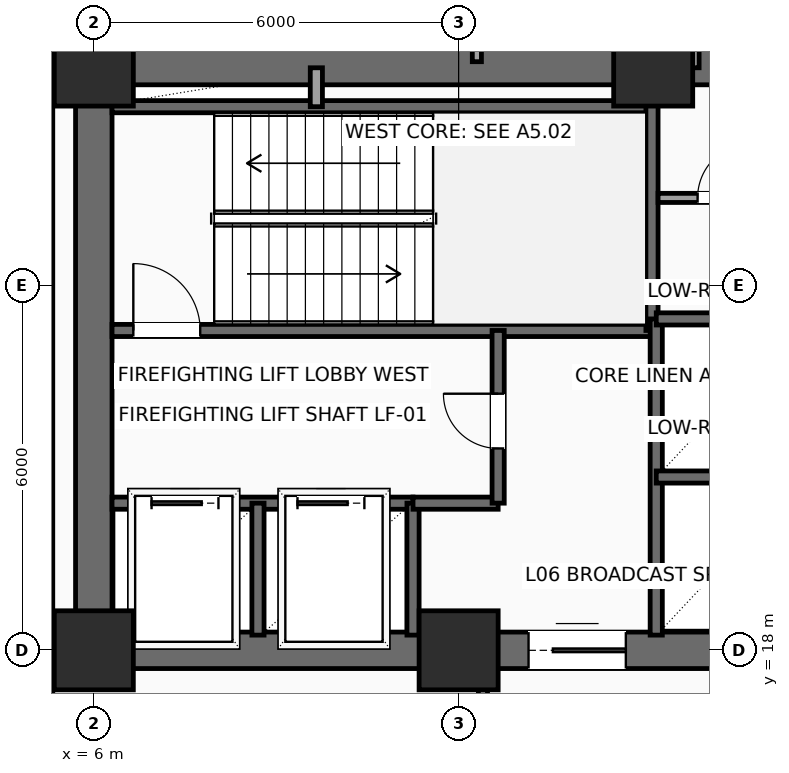
"""IFC4 building model, lengths in metres.
Left out: names, types, materials, properties, quantities, classifications, styles, units other than length and angle.
Written with IfcOpenShell. Run it as: python <this file> out.ifc"""

import sys

from ifc_helpers import new_model, si_unit, direction, frame, frame_2d, origin, origin_2d, place, context, subcontext, project, spatial, rectangle, extrude, element, fill, save


model = new_model("IFC4")
c1 = context("Model", 3, precision=1e-05, world=origin(), true_north=direction((0.0, 1.0)))
c2 = subcontext(c1, "Body", "Model", "MODEL_VIEW")
j1 = project(units=[si_unit("LENGTHUNIT", "METRE"), si_unit("PLANEANGLEUNIT", "RADIAN")], contexts=[c1])
p1 = place(None, origin())
s1 = spatial("IfcSite", under=j1, at=p1, CompositionType="ELEMENT")
p2 = place(p1, origin())
s2 = spatial("IfcBuilding", under=s1, at=p2, CompositionType="ELEMENT")
p3 = place(p2, frame((0.0, 0.0, 32.4)))
s3 = spatial("IfcBuildingStorey", under=s2, at=p3, CompositionType="ELEMENT", Elevation=32.4)
for number, where, z_axis, x_axis in (
    (1, (6.0, 18.0, 0.0), (0.0, 0.0, 1.0), (1.0, 0.0, 0.0)),
    (2, (12.0, 18.0, 0.0), (0.0, 0.0, 1.0), (1.0, 0.0, 0.0)),
    (3, (6.0, 27.6, 0.0), (0.0, 0.0, 1.0), (1.0, 0.0, 0.0)),
    (4, (15.2, 27.6, 0.0), (0.0, 0.0, 1.0), (1.0, 0.0, 0.0)),
):
    element("IfcColumn", number, at=place(p3, frame(where, z_axis=z_axis, x_axis=x_axis)), inside=s3, PredefinedType="COLUMN", context=c2, shape_type="SweptSolid", body=[
        extrude(rectangle(XDim=1.3, YDim=1.3, at=origin_2d()), origin(), (0.0, 0.0, 1.0), 3.9),
    ])
p4 = place(p3, frame((6.0, 18.0, 0.0), z_axis=(0.0, 0.0, 1.0), x_axis=(1.0, 0.0, 0.0)))
e5 = element("IfcWall", 5, at=p4, inside=s3, PredefinedType="SHEAR", context=c2, shape_type="SweptSolid", body=[
    extrude(rectangle(XDim=12.0, YDim=0.6, at=frame_2d((6.0, 0.0))), origin(), (0.0, 0.0, 1.0), 3.65),
])
p5 = place(p4, frame((7.15, 0.0, 0.0)))
e6 = element("IfcOpeningElement", 6, at=p5, cuts=e5, PredefinedType="OPENING", context=c2, shape_type="SweptSolid", body=[
    extrude(rectangle(XDim=1.6, YDim=2.3, at=frame_2d((0.8, 1.15))), frame((0.0, 0.31, 0.0), z_axis=(0.0, -1.0, 0.0), x_axis=(1.0, 0.0, 0.0)), (0.0, 0.0, 1.0), 0.62),
])
p6 = place(p3, frame((6.0, 27.6, 0.0), z_axis=(0.0, 0.0, 1.0), x_axis=(1.0, 0.0, 0.0)))
e7 = element("IfcWall", 7, at=p6, inside=s3, PredefinedType="SHEAR", context=c2, shape_type="SweptSolid", body=[
    extrude(rectangle(XDim=12.0, YDim=0.6, at=frame_2d((6.0, 0.0))), origin(), (0.0, 0.0, 1.0), 3.65),
])
p7 = place(p6, frame((10.2, 0.0, 0.0)))
e8 = element("IfcOpeningElement", 8, at=p7, cuts=e7, PredefinedType="OPENING", context=c2, shape_type="SweptSolid", body=[
    extrude(rectangle(XDim=0.9, YDim=2.15, at=frame_2d((0.45, 1.075))), frame((0.0, 0.31, 0.0), z_axis=(0.0, -1.0, 0.0), x_axis=(1.0, 0.0, 0.0)), (0.0, 0.0, 1.0), 0.62),
])
p8 = place(p3, frame((6.0, 18.0, 0.0), z_axis=(0.0, 0.0, 1.0), x_axis=(0.0, 1.0, 0.0)))
e9 = element("IfcWall", 9, at=p8, inside=s3, PredefinedType="SHEAR", context=c2, shape_type="SweptSolid", body=[
    extrude(rectangle(XDim=9.6, YDim=0.6, at=frame_2d((4.8, 0.0))), origin(), (0.0, 0.0, 1.0), 3.65),
])
p9 = place(p3, frame((6.3, 23.26, 0.0), z_axis=(0.0, 0.0, 1.0), x_axis=(1.0, 0.0, 0.0)))
e10 = element("IfcWall", 10, at=p9, inside=s3, PredefinedType="SHEAR", context=c2, shape_type="SweptSolid", body=[
    extrude(rectangle(XDim=8.88, YDim=0.2, at=frame_2d((4.44, 0.0))), origin(), (0.0, 0.0, 1.0), 3.65),
])
p10 = place(p9, frame((0.35, 0.0, 0.0)))
e11 = element("IfcOpeningElement", 11, at=p10, cuts=e10, PredefinedType="OPENING", context=c2, shape_type="SweptSolid", body=[
    extrude(rectangle(XDim=1.1, YDim=2.2, at=frame_2d((0.55, 1.1))), frame((0.0, 0.11, 0.0), z_axis=(0.0, -1.0, 0.0), x_axis=(1.0, 0.0, 0.0)), (0.0, 0.0, 1.0), 0.22),
])
p11 = place(p3, frame((6.3, 26.94, 0.0), z_axis=(0.0, 0.0, 1.0), x_axis=(1.0, 0.0, 0.0)))
e12 = element("IfcWall", 12, at=p11, inside=s3, PredefinedType="SHEAR", context=c2, shape_type="SweptSolid", body=[
    extrude(rectangle(XDim=8.88, YDim=0.2, at=frame_2d((4.44, 0.0))), origin(), (0.0, 0.0, 1.0), 3.65),
])
p12 = place(p3, frame((15.18, 23.26, 0.0), z_axis=(0.0, 0.0, 1.0), x_axis=(0.0, 1.0, 0.0)))
e13 = element("IfcWall", 13, at=p12, inside=s3, PredefinedType="SHEAR", context=c2, shape_type="SweptSolid", body=[
    extrude(rectangle(XDim=4.04, YDim=0.2, at=frame_2d((2.02, 0.0))), origin(), (0.0, 0.0, 1.0), 3.65),
])
p13 = place(p3, frame((6.3, 20.42, 0.0), z_axis=(0.0, 0.0, 1.0), x_axis=(1.0, 0.0, 0.0)))
e14 = element("IfcWall", 14, at=p13, inside=s3, PredefinedType="SHEAR", context=c2, shape_type="SweptSolid", body=[
    extrude(rectangle(XDim=4.95, YDim=0.2, at=frame_2d((2.475, 0.0))), origin(), (0.0, 0.0, 1.0), 3.65),
])
p14 = place(p13, frame((0.65, 0.0, 0.0)))
e15 = element("IfcOpeningElement", 15, at=p14, cuts=e14, PredefinedType="OPENING", context=c2, shape_type="SweptSolid", body=[
    extrude(rectangle(XDim=1.1, YDim=2.2, at=frame_2d((0.55, 1.1))), frame((0.0, 0.11, 0.0), z_axis=(0.0, -1.0, 0.0), x_axis=(1.0, 0.0, 0.0)), (0.0, 0.0, 1.0), 0.22),
])
p15 = place(p13, frame((3.05, 0.0, 0.0)))
e16 = element("IfcOpeningElement", 16, at=p15, cuts=e14, PredefinedType="OPENING", context=c2, shape_type="SweptSolid", body=[
    extrude(rectangle(XDim=1.1, YDim=2.2, at=frame_2d((0.55, 1.1))), frame((0.0, 0.11, 0.0), z_axis=(0.0, -1.0, 0.0), x_axis=(1.0, 0.0, 0.0)), (0.0, 0.0, 1.0), 0.22),
])
for number, where, z_axis, x_axis in (
    (17, (8.7, 18.25, 0.0), (0.0, 0.0, 1.0), (0.0, 1.0, 0.0)),
    (18, (11.25, 18.25, 0.0), (0.0, 0.0, 1.0), (0.0, 1.0, 0.0)),
):
    element("IfcWall", number, at=place(p3, frame(where, z_axis=z_axis, x_axis=x_axis)), inside=s3, PredefinedType="SHEAR", context=c2, shape_type="SweptSolid", body=[
        extrude(rectangle(XDim=2.17, YDim=0.2, at=frame_2d((1.085, 0.0))), origin(), (0.0, 0.0, 1.0), 3.65),
    ])
p16 = place(p3, frame((11.25, 20.42, 0.0), z_axis=(0.0, 0.0, 1.0), x_axis=(1.0, 0.0, 0.0)))
e19 = element("IfcWall", 19, at=p16, inside=s3, PredefinedType="SHEAR", context=c2, shape_type="SweptSolid", body=[
    extrude(rectangle(XDim=1.4, YDim=0.2, at=frame_2d((0.7, 0.0))), origin(), (0.0, 0.0, 1.0), 3.65),
])
p17 = place(p3, frame((12.65, 20.42, 0.0), z_axis=(0.0, 0.0, 1.0), x_axis=(0.0, 1.0, 0.0)))
e20 = element("IfcWall", 20, at=p17, inside=s3, PredefinedType="SHEAR", context=c2, shape_type="SweptSolid", body=[
    extrude(rectangle(XDim=2.84, YDim=0.2, at=frame_2d((1.42, 0.0))), origin(), (0.0, 0.0, 1.0), 3.65),
])
p18 = place(p17, frame((0.9, 0.0, 0.0)))
e21 = element("IfcOpeningElement", 21, at=p18, cuts=e20, PredefinedType="OPENING", context=c2, shape_type="SweptSolid", body=[
    extrude(rectangle(XDim=0.9, YDim=2.15, at=frame_2d((0.45, 1.075))), frame((0.0, 0.11, 0.0), z_axis=(0.0, -1.0, 0.0), x_axis=(1.0, 0.0, 0.0)), (0.0, 0.0, 1.0), 0.22),
])
p19 = place(p3, frame((9.66, 26.94, 0.0), z_axis=(0.0, 0.0, 1.0), x_axis=(0.0, 1.0, 0.0)))
e22 = element("IfcWall", 22, at=p19, inside=s3, PredefinedType="SOLIDWALL", context=c2, shape_type="SweptSolid", body=[
    extrude(rectangle(XDim=0.64, YDim=0.2, at=frame_2d((0.32, 0.0))), origin(), (0.0, 0.0, 1.0), 3.65),
])
p20 = place(p3, frame((15.25, 18.25, 0.0), z_axis=(0.0, 0.0, 1.0), x_axis=(0.0, 1.0, 0.0)))
e23 = element("IfcWall", 23, at=p20, inside=s3, PredefinedType="SHEAR", context=c2, shape_type="SweptSolid", body=[
    extrude(rectangle(XDim=5.2, YDim=0.2, at=frame_2d((2.6, 0.0))), origin(), (0.0, 0.0, 1.0), 3.65),
])
p21 = place(p3, frame((15.25, 20.85, 0.0), z_axis=(0.0, 0.0, 1.0), x_axis=(1.0, 0.0, 0.0)))
e24 = element("IfcWall", 24, at=p21, inside=s3, PredefinedType="SHEAR", context=c2, shape_type="SweptSolid", body=[
    extrude(rectangle(XDim=2.4, YDim=0.2, at=frame_2d((1.2, 0.0))), origin(), (0.0, 0.0, 1.0), 3.65),
])
p22 = place(p3, frame((15.25, 23.45, 0.0), z_axis=(0.0, 0.0, 1.0), x_axis=(1.0, 0.0, 0.0)))
e25 = element("IfcWall", 25, at=p22, inside=s3, PredefinedType="SHEAR", context=c2, shape_type="SweptSolid", body=[
    extrude(rectangle(XDim=2.45, YDim=0.2, at=frame_2d((1.225, 0.0))), origin(), (0.0, 0.0, 1.0), 3.65),
])
p23 = place(p3, frame((15.28, 25.44, 0.0), z_axis=(0.0, 0.0, 1.0), x_axis=(1.0, 0.0, 0.0)))
e26 = element("IfcWall", 26, at=p23, inside=s3, PredefinedType="PARTITIONING", context=c2, shape_type="SweptSolid", body=[
    extrude(rectangle(XDim=2.42, YDim=0.15, at=frame_2d((1.21, 0.0))), origin(), (0.0, 0.0, 1.0), 3.65),
])
p24 = place(p23, frame((0.65, 0.0, 0.0)))
e27 = element("IfcOpeningElement", 27, at=p24, cuts=e26, PredefinedType="OPENING", context=c2, shape_type="SweptSolid", body=[
    extrude(rectangle(XDim=0.9, YDim=2.15, at=frame_2d((0.45, 1.075))), frame((0.0, 0.085, 0.0), z_axis=(0.0, -1.0, 0.0), x_axis=(1.0, 0.0, 0.0)), (0.0, 0.0, 1.0), 0.17),
])
p25 = place(p3, frame((15.88, 27.58, 0.0), z_axis=(0.0, 0.0, 1.0), x_axis=(0.0, 1.0, 0.0)))
e28 = element("IfcWall", 28, at=p25, inside=s3, PredefinedType="PARTITIONING", context=c2, shape_type="SweptSolid", body=[
    extrude(rectangle(XDim=2.67, YDim=0.15, at=frame_2d((1.335, 0.0))), origin(), (0.0, 0.0, 1.0), 3.65),
])
p26 = place(p3, frame((5.25, 30.25, 0.0), z_axis=(0.0, 0.0, 1.0), x_axis=(0.0, -1.0, 0.0)))
e29 = element("IfcWall", 29, at=p26, inside=s3, PredefinedType="PARTITIONING", context=c2, shape_type="SweptSolid", body=[
    extrude(rectangle(XDim=14.1, YDim=0.15, at=frame_2d((7.05, 0.0))), origin(), (0.0, 0.0, 1.0), 3.65),
])
p27 = place(p3, frame((12.4, 16.15, 0.0), z_axis=(0.0, 0.0, 1.0), x_axis=(0.0, 1.0, 0.0)))
e30 = element("IfcWall", 30, at=p27, inside=s3, PredefinedType="PARTITIONING", context=c2, shape_type="SweptSolid", body=[
    extrude(rectangle(XDim=1.8, YDim=0.15, at=frame_2d((0.9, 0.0))), origin(), (0.0, 0.0, 1.0), 3.65),
])
for number, where, z_axis, x_axis in (
    (31, (6.3, 27.68, 0.0), (0.0, 0.0, 1.0), (0.0, 1.0, 0.0)),
    (32, (12.3, 27.68, 0.0), (0.0, 0.0, 1.0), (0.0, 1.0, 0.0)),
):
    element("IfcWall", number, at=place(p3, frame(where, z_axis=z_axis, x_axis=x_axis)), inside=s3, PredefinedType="PARTITIONING", context=c2, shape_type="SweptSolid", body=[
        extrude(rectangle(XDim=2.57, YDim=0.15, at=frame_2d((1.285, 0.0))), origin(), (0.0, 0.0, 1.0), 2.992),
    ])
p28 = place(p5, origin())
e33 = element("IfcDoor", 33, at=p28, inside=s3, OperationType="DOUBLE_DOOR_SLIDING", PredefinedType="DOOR", context=c2, shape_type="SweptSolid", body=[
    extrude(rectangle(XDim=1.6, YDim=2.3, at=frame_2d((0.8, 1.15))), frame((0.0, 0.025, 0.0), z_axis=(0.0, -1.0, 0.0), x_axis=(1.0, 0.0, 0.0)), (0.0, 0.0, 1.0), 0.05),
])
fill(e6, e33)
p29 = place(p10, origin())
e34 = element("IfcDoor", 34, at=p29, inside=s3, OperationType="SINGLE_SWING_LEFT", PredefinedType="DOOR", context=c2, shape_type="SweptSolid", body=[
    extrude(rectangle(XDim=1.1, YDim=2.2, at=frame_2d((0.55, 1.1))), frame((0.0, 0.025, 0.0), z_axis=(0.0, -1.0, 0.0), x_axis=(1.0, 0.0, 0.0)), (0.0, 0.0, 1.0), 0.05),
])
fill(e11, e34)
p30 = place(p14, origin())
e35 = element("IfcDoor", 35, at=p30, inside=s3, OperationType="SLIDING_TO_LEFT", PredefinedType="DOOR", context=c2, shape_type="SweptSolid", body=[
    extrude(rectangle(XDim=1.1, YDim=2.2, at=frame_2d((0.55, 1.1))), frame((0.0, 0.025, 0.0), z_axis=(0.0, -1.0, 0.0), x_axis=(1.0, 0.0, 0.0)), (0.0, 0.0, 1.0), 0.05),
])
fill(e15, e35)
p31 = place(p15, origin())
e36 = element("IfcDoor", 36, at=p31, inside=s3, OperationType="SLIDING_TO_LEFT", PredefinedType="DOOR", context=c2, shape_type="SweptSolid", body=[
    extrude(rectangle(XDim=1.1, YDim=2.2, at=frame_2d((0.55, 1.1))), frame((0.0, 0.025, 0.0), z_axis=(0.0, -1.0, 0.0), x_axis=(1.0, 0.0, 0.0)), (0.0, 0.0, 1.0), 0.05),
])
fill(e16, e36)
p32 = place(p18, origin())
e37 = element("IfcDoor", 37, at=p32, inside=s3, OperationType="SINGLE_SWING_RIGHT", PredefinedType="DOOR", context=c2, shape_type="SweptSolid", body=[
    extrude(rectangle(XDim=0.9, YDim=2.15, at=frame_2d((0.45, 1.075))), frame((0.0, 0.025, 0.0), z_axis=(0.0, -1.0, 0.0), x_axis=(1.0, 0.0, 0.0)), (0.0, 0.0, 1.0), 0.05),
])
fill(e21, e37)
p33 = place(p24, origin())
e38 = element("IfcDoor", 38, at=p33, inside=s3, OperationType="SINGLE_SWING_RIGHT", PredefinedType="DOOR", context=c2, shape_type="SweptSolid", body=[
    extrude(rectangle(XDim=0.9, YDim=2.15, at=frame_2d((0.45, 1.075))), frame((0.0, 0.025, 0.0), z_axis=(0.0, -1.0, 0.0), x_axis=(1.0, 0.0, 0.0)), (0.0, 0.0, 1.0), 0.05),
])
fill(e27, e38)
save(model, sys.argv[1])
